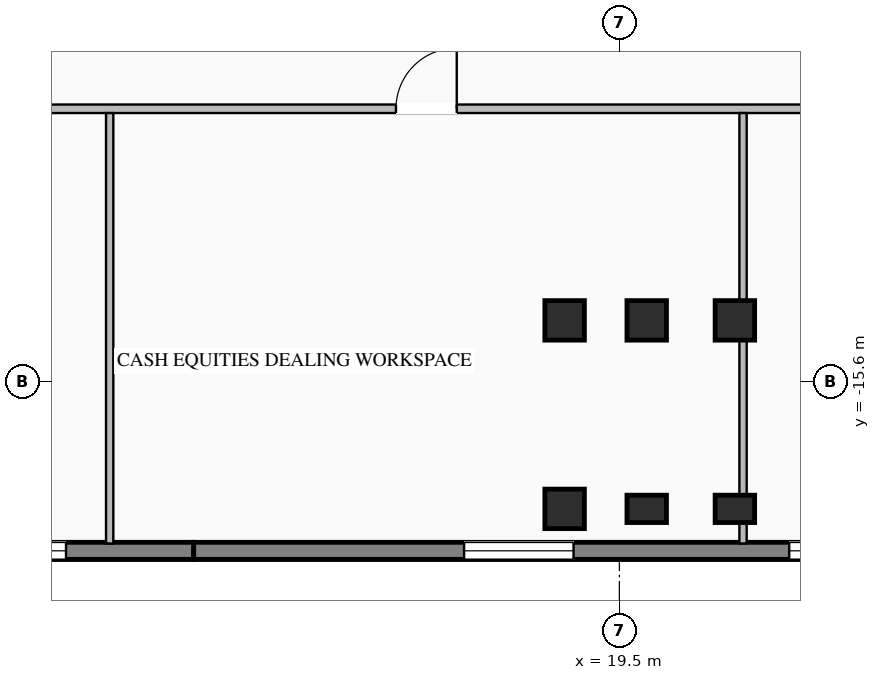
"""IFC4 building model, lengths in metres.
Left out: names, types, materials, properties, quantities, classifications, styles, units other than length and angle.
Written with IfcOpenShell. Run it as: python <this file> out.ifc"""

import sys

from ifc_helpers import new_model, si_unit, direction, frame, frame_2d, origin, origin_2d, place, context, subcontext, project, spatial, rectangle, i_section, extrude, element, fill, save


model = new_model("IFC4")
c1 = context("Model", 3, precision=1e-05, world=origin(), true_north=direction((0.0, 1.0)))
c2 = subcontext(c1, "Body", "Model", "MODEL_VIEW")
j1 = project(units=[si_unit("LENGTHUNIT", "METRE"), si_unit("PLANEANGLEUNIT", "RADIAN")], contexts=[c1])
p1 = place(None, origin())
s1 = spatial("IfcSite", under=j1, at=p1, CompositionType="ELEMENT")
p2 = place(p1, origin())
s2 = spatial("IfcBuilding", under=s1, at=p2, CompositionType="ELEMENT")
p3 = place(p2, frame((0.0, 0.0, 141.55)))
s3 = spatial("IfcBuildingStorey", under=s2, at=p3, CompositionType="ELEMENT", Elevation=141.55)
for number, where, z_axis, x_axis in (
    (1, (18.6, -14.6, 0.0), (0.0, 0.0, 1.0), (1.0, 0.0, 0.0)),
    (2, (19.95, -14.6, 0.0), (0.0, 0.0, 1.0), (1.0, 0.0, 0.0)),
    (3, (21.4, -14.6, 0.0), (0.0, 0.0, 1.0), (1.0, 0.0, 0.0)),
    (4, (18.6, -17.7, 0.0), (0.0, 0.0, 1.0), (1.0, 0.0, 0.0)),
):
    element("IfcColumn", number, at=place(p3, frame(where, z_axis=z_axis, x_axis=x_axis)), inside=s3, PredefinedType="COLUMN", context=c2, shape_type="SweptSolid", body=[
        extrude(i_section(OverallWidth=0.65, OverallDepth=0.65, WebThickness=0.028, FlangeThickness=0.04, at=origin_2d()), origin(), (0.0, 0.0, 1.0), 3.45),
    ])
for number, where, z_axis, x_axis in (
    (5, (19.95, -17.7, 0.0), (0.0, 0.0, 1.0), (1.0, 0.0, 0.0)),
    (6, (21.4, -17.7, 0.0), (0.0, 0.0, 1.0), (1.0, 0.0, 0.0)),
):
    element("IfcColumn", number, at=place(p3, frame(where, z_axis=z_axis, x_axis=x_axis)), inside=s3, PredefinedType="PILASTER", context=c2, shape_type="SweptSolid", body=[
        extrude(rectangle(XDim=0.65, YDim=0.45, at=origin_2d()), origin(), (0.0, 0.0, 1.0), 3.45),
    ])
p4 = place(p3, frame((12.5, -18.39, 0.0), z_axis=(0.0, 0.0, 1.0), x_axis=(-1.0, 0.0, 0.0)))
e7 = element("IfcWall", 7, at=p4, inside=s3, PredefinedType="STANDARD", context=c2, shape_type="SweptSolid", body=[
    extrude(rectangle(XDim=9.0, YDim=0.28, at=frame_2d((4.5, 0.0))), origin(), (0.0, 0.0, 1.0), 3.25),
])
p5 = place(p4, frame((2.1, 0.0, 0.76)))
e8 = element("IfcOpeningElement", 8, at=p5, cuts=e7, PredefinedType="OPENING", context=c2, shape_type="SweptSolid", body=[
    extrude(rectangle(XDim=1.8, YDim=1.95, at=frame_2d((0.9, 0.975))), frame((0.0, 0.15, 0.0), z_axis=(0.0, -1.0, 0.0), x_axis=(1.0, 0.0, 0.0)), (0.0, 0.0, 1.0), 0.3),
])
p6 = place(p4, frame((5.1, 0.0, 0.76)))
e9 = element("IfcOpeningElement", 9, at=p6, cuts=e7, PredefinedType="OPENING", context=c2, shape_type="SweptSolid", body=[
    extrude(rectangle(XDim=1.8, YDim=1.95, at=frame_2d((0.9, 0.975))), frame((0.0, 0.15, 0.0), z_axis=(0.0, -1.0, 0.0), x_axis=(1.0, 0.0, 0.0)), (0.0, 0.0, 1.0), 0.3),
])
p7 = place(p3, frame((28.54, -18.39, 0.0), z_axis=(0.0, 0.0, 1.0), x_axis=(-1.0, 0.0, 0.0)))
e10 = element("IfcWall", 10, at=p7, inside=s3, PredefinedType="STANDARD", context=c2, shape_type="SweptSolid", body=[
    extrude(rectangle(XDim=16.04, YDim=0.28, at=frame_2d((8.02, 0.0))), origin(), (0.0, 0.0, 1.0), 3.25),
])
p8 = place(p7, frame((4.447, 0.0, 0.76)))
e11 = element("IfcOpeningElement", 11, at=p8, cuts=e10, PredefinedType="OPENING", context=c2, shape_type="SweptSolid", body=[
    extrude(rectangle(XDim=1.8, YDim=1.95, at=frame_2d((0.9, 0.975))), frame((0.0, 0.15, 0.0), z_axis=(0.0, -1.0, 0.0), x_axis=(1.0, 0.0, 0.0)), (0.0, 0.0, 1.0), 0.3),
])
p9 = place(p7, frame((9.793, 0.0, 0.76)))
e12 = element("IfcOpeningElement", 12, at=p9, cuts=e10, PredefinedType="OPENING", context=c2, shape_type="SweptSolid", body=[
    extrude(rectangle(XDim=1.8, YDim=1.95, at=frame_2d((0.9, 0.975))), frame((0.0, 0.15, 0.0), z_axis=(0.0, -1.0, 0.0), x_axis=(1.0, 0.0, 0.0)), (0.0, 0.0, 1.0), 0.3),
])
p10 = place(p3, frame((-32.82, -11.12, 0.0), z_axis=(0.0, 0.0, 1.0), x_axis=(1.0, 0.0, 0.0)))
e13 = element("IfcWall", 13, at=p10, inside=s3, PredefinedType="STANDARD", context=c2, shape_type="SweptSolid", body=[
    extrude(rectangle(XDim=63.64, YDim=0.14, at=frame_2d((31.82, 0.0))), origin(), (0.0, 0.0, 1.0), 3.25),
])
p11 = place(p10, frame((25.91, 0.0, 0.0)))
e14 = element("IfcOpeningElement", 14, at=p11, cuts=e13, PredefinedType="OPENING", context=c2, shape_type="SweptSolid", body=[
    extrude(rectangle(XDim=0.92, YDim=2.08, at=frame_2d((0.46, 1.04))), frame((0.0, 0.08, 0.0), z_axis=(0.0, -1.0, 0.0), x_axis=(1.0, 0.0, 0.0)), (0.0, 0.0, 1.0), 0.16),
])
p12 = place(p10, frame((29.41, 0.0, 0.0)))
e15 = element("IfcOpeningElement", 15, at=p12, cuts=e13, PredefinedType="OPENING", context=c2, shape_type="SweptSolid", body=[
    extrude(rectangle(XDim=0.92, YDim=2.08, at=frame_2d((0.46, 1.04))), frame((0.0, 0.08, 0.0), z_axis=(0.0, -1.0, 0.0), x_axis=(1.0, 0.0, 0.0)), (0.0, 0.0, 1.0), 0.16),
])
p13 = place(p10, frame((32.26, 0.0, 0.0)))
e16 = element("IfcOpeningElement", 16, at=p13, cuts=e13, PredefinedType="OPENING", context=c2, shape_type="SweptSolid", body=[
    extrude(rectangle(XDim=0.92, YDim=2.08, at=frame_2d((0.46, 1.04))), frame((0.0, 0.08, 0.0), z_axis=(0.0, -1.0, 0.0), x_axis=(1.0, 0.0, 0.0)), (0.0, 0.0, 1.0), 0.16),
])
p14 = place(p10, frame((3.831, 0.0, 0.0)))
e17 = element("IfcOpeningElement", 17, at=p14, cuts=e13, PredefinedType="OPENING", context=c2, shape_type="SweptSolid", body=[
    extrude(rectangle(XDim=1.0, YDim=2.08, at=frame_2d((0.5, 1.04))), frame((0.0, 0.08, 0.0), z_axis=(0.0, -1.0, 0.0), x_axis=(1.0, 0.0, 0.0)), (0.0, 0.0, 1.0), 0.16),
])
p15 = place(p10, frame((12.208, 0.0, 0.0)))
e18 = element("IfcOpeningElement", 18, at=p15, cuts=e13, PredefinedType="OPENING", context=c2, shape_type="SweptSolid", body=[
    extrude(rectangle(XDim=1.0, YDim=2.08, at=frame_2d((0.5, 1.04))), frame((0.0, 0.08, 0.0), z_axis=(0.0, -1.0, 0.0), x_axis=(1.0, 0.0, 0.0)), (0.0, 0.0, 1.0), 0.16),
])
p16 = place(p10, frame((20.313, 0.0, 0.0)))
e19 = element("IfcOpeningElement", 19, at=p16, cuts=e13, PredefinedType="OPENING", context=c2, shape_type="SweptSolid", body=[
    extrude(rectangle(XDim=1.0, YDim=2.08, at=frame_2d((0.5, 1.04))), frame((0.0, 0.08, 0.0), z_axis=(0.0, -1.0, 0.0), x_axis=(1.0, 0.0, 0.0)), (0.0, 0.0, 1.0), 0.16),
])
p17 = place(p10, frame((38.379, 0.0, 0.0)))
e20 = element("IfcOpeningElement", 20, at=p17, cuts=e13, PredefinedType="OPENING", context=c2, shape_type="SweptSolid", body=[
    extrude(rectangle(XDim=1.0, YDim=2.08, at=frame_2d((0.5, 1.04))), frame((0.0, 0.08, 0.0), z_axis=(0.0, -1.0, 0.0), x_axis=(1.0, 0.0, 0.0)), (0.0, 0.0, 1.0), 0.16),
])
p18 = place(p10, frame((48.646, 0.0, 0.0)))
e21 = element("IfcOpeningElement", 21, at=p18, cuts=e13, PredefinedType="OPENING", context=c2, shape_type="SweptSolid", body=[
    extrude(rectangle(XDim=1.0, YDim=2.08, at=frame_2d((0.5, 1.04))), frame((0.0, 0.08, 0.0), z_axis=(0.0, -1.0, 0.0), x_axis=(1.0, 0.0, 0.0)), (0.0, 0.0, 1.0), 0.16),
])
p19 = place(p10, frame((58.371, 0.0, 0.0)))
e22 = element("IfcOpeningElement", 22, at=p19, cuts=e13, PredefinedType="OPENING", context=c2, shape_type="SweptSolid", body=[
    extrude(rectangle(XDim=1.0, YDim=2.08, at=frame_2d((0.5, 1.04))), frame((0.0, 0.08, 0.0), z_axis=(0.0, -1.0, 0.0), x_axis=(1.0, 0.0, 0.0)), (0.0, 0.0, 1.0), 0.16),
])
p20 = place(p3, frame((11.118, -18.27, 0.0), z_axis=(0.0, 0.0, 1.0), x_axis=(0.0, 1.0, 0.0)))
e23 = element("IfcWall", 23, at=p20, inside=s3, PredefinedType="STANDARD", context=c2, shape_type="SweptSolid", body=[
    extrude(rectangle(XDim=7.08, YDim=0.12, at=frame_2d((3.54, 0.0))), origin(), (0.0, 0.0, 1.0), 3.25),
])
p21 = place(p3, frame((21.534, -18.27, 0.0), z_axis=(0.0, 0.0, 1.0), x_axis=(0.0, 1.0, 0.0)))
e24 = element("IfcWall", 24, at=p21, inside=s3, PredefinedType="STANDARD", context=c2, shape_type="SweptSolid", body=[
    extrude(rectangle(XDim=7.08, YDim=0.12, at=frame_2d((3.54, 0.0))), origin(), (0.0, 0.0, 1.0), 2.645),
])
p22 = place(p5, origin())
e25 = element("IfcWindow", 25, at=p22, inside=s3, PartitioningType="SINGLE_PANEL", PredefinedType="WINDOW", context=c2, shape_type="SweptSolid", body=[
    extrude(rectangle(XDim=1.8, YDim=1.95, at=frame_2d((0.9, 0.975))), frame((0.0, 0.03, 0.0), z_axis=(0.0, -1.0, 0.0), x_axis=(1.0, 0.0, 0.0)), (0.0, 0.0, 1.0), 0.06),
])
fill(e8, e25)
p23 = place(p8, origin())
e26 = element("IfcWindow", 26, at=p23, inside=s3, PartitioningType="SINGLE_PANEL", PredefinedType="WINDOW", context=c2, shape_type="SweptSolid", body=[
    extrude(rectangle(XDim=1.8, YDim=1.95, at=frame_2d((0.9, 0.975))), frame((0.0, 0.03, 0.0), z_axis=(0.0, -1.0, 0.0), x_axis=(1.0, 0.0, 0.0)), (0.0, 0.0, 1.0), 0.06),
])
fill(e11, e26)
p24 = place(p9, origin())
e27 = element("IfcWindow", 27, at=p24, inside=s3, PartitioningType="SINGLE_PANEL", PredefinedType="WINDOW", context=c2, shape_type="SweptSolid", body=[
    extrude(rectangle(XDim=1.8, YDim=1.95, at=frame_2d((0.9, 0.975))), frame((0.0, 0.03, 0.0), z_axis=(0.0, -1.0, 0.0), x_axis=(1.0, 0.0, 0.0)), (0.0, 0.0, 1.0), 0.06),
])
fill(e12, e27)
p25 = place(p18, origin())
e28 = element("IfcDoor", 28, at=p25, inside=s3, OperationType="SINGLE_SWING_RIGHT", PredefinedType="DOOR", context=c2, shape_type="SweptSolid", body=[
    extrude(rectangle(XDim=1.0, YDim=2.08, at=frame_2d((0.5, 1.04))), frame((0.0, 0.025, 0.0), z_axis=(0.0, -1.0, 0.0), x_axis=(1.0, 0.0, 0.0)), (0.0, 0.0, 1.0), 0.05),
])
fill(e21, e28)
save(model, sys.argv[1])
